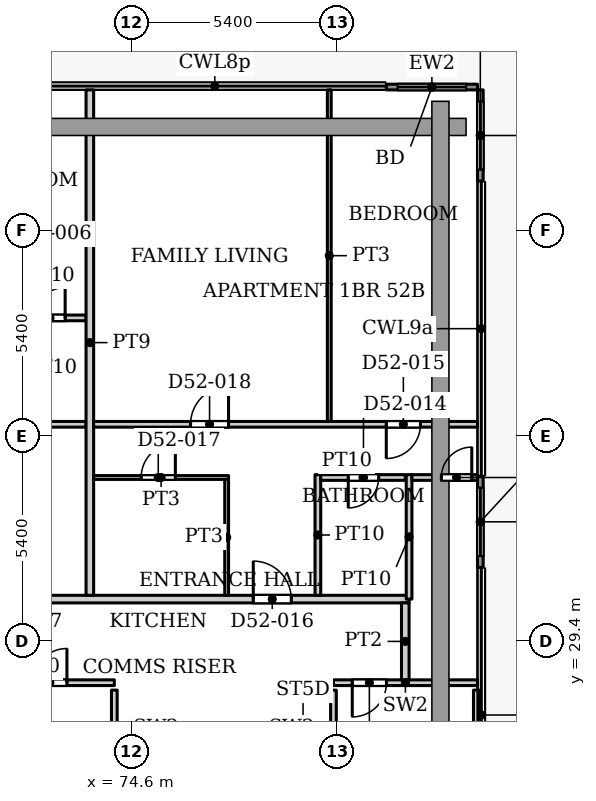
"""IFC4 building model, lengths in metres.
Left out: names, types, materials, properties, quantities, classifications, styles, units other than length and angle.
Written with IfcOpenShell. Run it as: python <this file> out.ifc"""

import sys

from ifc_helpers import new_model, si_unit, direction, frame, frame_2d, origin, place, context, subcontext, project, spatial, rectangle, extrude, source, transform, mapped, element, fill, save


model = new_model("IFC4")
c1 = context("Model", 3, precision=1e-05, world=origin(), true_north=direction((0.0, 1.0)))
c2 = subcontext(c1, "Body", "Model", "MODEL_VIEW")
j1 = project(units=[si_unit("LENGTHUNIT", "METRE"), si_unit("PLANEANGLEUNIT", "RADIAN")], contexts=[c1])
p1 = place(None, origin())
s1 = spatial("IfcSite", under=j1, at=p1, CompositionType="ELEMENT")
p2 = place(p1, origin())
s2 = spatial("IfcBuilding", under=s1, at=p2, CompositionType="ELEMENT")
p3 = place(p2, frame((0.0, 0.0, 224.0)))
s3 = spatial("IfcBuildingStorey", under=s2, at=p3, CompositionType="ELEMENT", Elevation=224.0)
p4 = place(p3, frame((81.3, 43.975, 0.0), z_axis=(0.0, 0.0, 1.0), x_axis=(1.0, 0.0, 0.0)))
e1 = element("IfcWall", 1, at=p4, inside=s3, PredefinedType="SOLIDWALL", context=c2, shape_type="SweptSolid", body=[
    extrude(rectangle(XDim=2.4, YDim=0.15, at=frame_2d((1.2, 0.0))), origin(), (0.0, 0.0, 1.0), 3.75),
])
p5 = place(p4, frame((0.3, 0.0, 0.0)))
e2 = element("IfcOpeningElement", 2, at=p5, cuts=e1, PredefinedType="OPENING", context=c2, shape_type="SweptSolid", body=[
    extrude(rectangle(XDim=1.8, YDim=2.4, at=frame_2d((0.9, 1.2))), frame((0.0, 0.085, 0.0), z_axis=(0.0, -1.0, 0.0), x_axis=(1.0, 0.0, 0.0)), (0.0, 0.0, 1.0), 0.17),
])
p6 = place(p3, frame((83.775, 43.9, 0.0), z_axis=(0.0, 0.0, 1.0), x_axis=(0.0, -1.0, 0.0)))
e3 = element("IfcWall", 3, at=p6, inside=s3, PredefinedType="SOLIDWALL", context=c2, shape_type="SweptSolid", body=[
    extrude(rectangle(XDim=2.4, YDim=0.15, at=frame_2d((1.2, 0.0))), origin(), (0.0, 0.0, 1.0), 3.75),
])
p7 = place(p6, frame((0.3, 0.0, 0.0)))
e4 = element("IfcOpeningElement", 4, at=p7, cuts=e3, PredefinedType="OPENING", context=c2, shape_type="SweptSolid", body=[
    extrude(rectangle(XDim=1.8, YDim=2.4, at=frame_2d((0.9, 1.2))), frame((0.0, 0.085, 0.0), z_axis=(0.0, -1.0, 0.0), x_axis=(1.0, 0.0, 0.0)), (0.0, 0.0, 1.0), 0.17),
])
p8 = place(p3, frame((83.775, 33.733, 0.0), z_axis=(0.0, 0.0, 1.0), x_axis=(0.0, -1.0, 0.0)))
e5 = element("IfcWall", 5, at=p8, inside=s3, PredefinedType="SOLIDWALL", context=c2, shape_type="SweptSolid", body=[
    extrude(rectangle(XDim=2.399, YDim=0.15, at=frame_2d((1.199, 0.0))), origin(), (0.0, 0.0, 1.0), 3.75),
])
p9 = place(p8, frame((0.3, 0.0, 0.0)))
e6 = element("IfcOpeningElement", 6, at=p9, cuts=e5, PredefinedType="OPENING", context=c2, shape_type="SweptSolid", body=[
    extrude(rectangle(XDim=1.8, YDim=2.4, at=frame_2d((0.9, 1.2))), frame((0.0, 0.085, 0.0), z_axis=(0.0, -1.0, 0.0), x_axis=(1.0, 0.0, 0.0)), (0.0, 0.0, 1.0), 0.17),
])
p10 = place(p3, frame((70.75, 28.3, 0.0), z_axis=(0.0, 0.0, 1.0), x_axis=(1.0, 0.0, 0.0)))
e7 = element("IfcWall", 7, at=p10, inside=s3, PredefinedType="PARTITIONING", context=c2, shape_type="SweptSolid", body=[
    extrude(rectangle(XDim=3.394, YDim=0.15, at=frame_2d((1.697, 0.0))), origin(), (0.0, 0.0, 1.0), 3.9),
])
p11 = place(p10, frame((1.247, 0.0, 0.0)))
e8 = element("IfcOpeningElement", 8, at=p11, cuts=e7, PredefinedType="OPENING", context=c2, shape_type="SweptSolid", body=[
    extrude(rectangle(XDim=0.9, YDim=2.2, at=frame_2d((0.45, 1.1))), frame((0.0, 0.085, 0.0), z_axis=(0.0, -1.0, 0.0), x_axis=(1.0, 0.0, 0.0)), (0.0, 0.0, 1.0), 0.17),
])
p12 = place(p3, frame((74.144, 26.12, 0.0), z_axis=(0.0, 0.0, 1.0), x_axis=(0.0, 1.0, 0.0)))
e9 = element("IfcWall", 9, at=p12, inside=s3, PredefinedType="PARTITIONING", context=c2, shape_type="SweptSolid", body=[
    extrude(rectangle(XDim=1.985, YDim=0.15, at=frame_2d((0.992, 0.0))), origin(), (0.0, 0.0, 1.0), 3.9),
])
p13 = place(p3, frame((79.91, 28.3, 0.0), z_axis=(0.0, 0.0, 1.0), x_axis=(1.0, 0.0, 0.0)))
e10 = element("IfcWall", 10, at=p13, inside=s3, PredefinedType="PARTITIONING", context=c2, shape_type="SweptSolid", body=[
    extrude(rectangle(XDim=3.788, YDim=0.15, at=frame_2d((1.894, 0.0))), origin(), (0.0, 0.0, 1.0), 3.9),
])
p14 = place(p13, frame((0.495, 0.0, 0.0)))
e11 = element("IfcOpeningElement", 11, at=p14, cuts=e10, PredefinedType="OPENING", context=c2, shape_type="SweptSolid", body=[
    extrude(rectangle(XDim=0.9, YDim=2.2, at=frame_2d((0.45, 1.1))), frame((0.0, 0.085, 0.0), z_axis=(0.0, -1.0, 0.0), x_axis=(1.0, 0.0, 0.0)), (0.0, 0.0, 1.0), 0.17),
])
p15 = place(p3, frame((79.91, 26.12, 0.0), z_axis=(0.0, 0.0, 1.0), x_axis=(0.0, 1.0, 0.0)))
e12 = element("IfcWall", 12, at=p15, inside=s3, PredefinedType="PARTITIONING", context=c2, shape_type="SweptSolid", body=[
    extrude(rectangle(XDim=1.985, YDim=0.15, at=frame_2d((0.992, 0.0))), origin(), (0.0, 0.0, 1.0), 3.9),
])
p16 = place(p3, frame((83.67, 21.868, 0.0), z_axis=(0.0, 0.0, 1.0), x_axis=(0.0, 1.0, 0.0)))
e13 = element("IfcWall", 13, at=p16, inside=s3, PredefinedType="PARTITIONING", context=c2, shape_type="SweptSolid", body=[
    extrude(rectangle(XDim=6.237, YDim=0.15, at=frame_2d((3.119, 0.0))), origin(), (0.0, 0.0, 1.0), 3.9),
])
p17 = place(p3, frame((53.499, 30.5, 0.0), z_axis=(0.0, 0.0, 1.0), x_axis=(1.0, 0.0, 0.0)))
e14 = element("IfcWall", 14, at=p17, inside=s3, PredefinedType="PARTITIONING", context=c2, shape_type="SweptSolid", body=[
    extrude(rectangle(XDim=28.401, YDim=0.2, at=frame_2d((14.2, 0.0))), origin(), (0.0, 0.0, 1.0), 3.6),
])
p18 = place(p17, frame((17.701, 0.0, 0.0)))
e15 = element("IfcOpeningElement", 15, at=p18, cuts=e14, PredefinedType="OPENING", context=c2, shape_type="SweptSolid", body=[
    extrude(rectangle(XDim=1.0, YDim=2.1, at=frame_2d((0.5, 1.05))), frame((0.0, 0.11, 0.0), z_axis=(0.0, -1.0, 0.0), x_axis=(1.0, 0.0, 0.0)), (0.0, 0.0, 1.0), 0.22),
])
p19 = place(p17, frame((24.301, 0.0, 0.0)))
e16 = element("IfcOpeningElement", 16, at=p19, cuts=e14, PredefinedType="OPENING", context=c2, shape_type="SweptSolid", body=[
    extrude(rectangle(XDim=1.0, YDim=2.1, at=frame_2d((0.5, 1.05))), frame((0.0, 0.11, 0.0), z_axis=(0.0, -1.0, 0.0), x_axis=(1.0, 0.0, 0.0)), (0.0, 0.0, 1.0), 0.22),
])
p20 = place(p3, frame((53.499, 35.1, 0.0), z_axis=(0.0, 0.0, 1.0), x_axis=(1.0, 0.0, 0.0)))
e17 = element("IfcWall", 17, at=p20, inside=s3, PredefinedType="PARTITIONING", context=c2, shape_type="SweptSolid", body=[
    extrude(rectangle(XDim=19.901, YDim=0.15, at=frame_2d((9.95, 0.0))), origin(), (0.0, 0.0, 1.0), 3.6),
])
p21 = place(p20, frame((8.451, 0.0, 0.0)))
e18 = element("IfcOpeningElement", 18, at=p21, cuts=e17, PredefinedType="OPENING", context=c2, shape_type="SweptSolid", body=[
    extrude(rectangle(XDim=0.9, YDim=2.1, at=frame_2d((0.45, 1.05))), frame((0.0, 0.085, 0.0), z_axis=(0.0, -1.0, 0.0), x_axis=(1.0, 0.0, 0.0)), (0.0, 0.0, 1.0), 0.17),
])
p22 = place(p20, frame((11.601, 0.0, 0.0)))
e19 = element("IfcOpeningElement", 19, at=p22, cuts=e17, PredefinedType="OPENING", context=c2, shape_type="SweptSolid", body=[
    extrude(rectangle(XDim=0.9, YDim=2.1, at=frame_2d((0.45, 1.05))), frame((0.0, 0.085, 0.0), z_axis=(0.0, -1.0, 0.0), x_axis=(1.0, 0.0, 0.0)), (0.0, 0.0, 1.0), 0.17),
])
p23 = place(p20, frame((1.701, 0.0, 0.0)))
e20 = element("IfcOpeningElement", 20, at=p23, cuts=e17, PredefinedType="OPENING", context=c2, shape_type="SweptSolid", body=[
    extrude(rectangle(XDim=1.0, YDim=2.1, at=frame_2d((0.5, 1.05))), frame((0.0, 0.085, 0.0), z_axis=(0.0, -1.0, 0.0), x_axis=(1.0, 0.0, 0.0)), (0.0, 0.0, 1.0), 0.17),
])
p24 = place(p20, frame((4.801, 0.0, 0.0)))
e21 = element("IfcOpeningElement", 21, at=p24, cuts=e17, PredefinedType="OPENING", context=c2, shape_type="SweptSolid", body=[
    extrude(rectangle(XDim=1.6, YDim=2.1, at=frame_2d((0.8, 1.05))), frame((0.0, 0.085, 0.0), z_axis=(0.0, -1.0, 0.0), x_axis=(1.0, 0.0, 0.0)), (0.0, 0.0, 1.0), 0.17),
])
p25 = place(p20, frame((15.701, 0.0, 0.0)))
e22 = element("IfcOpeningElement", 22, at=p25, cuts=e17, PredefinedType="OPENING", context=c2, shape_type="SweptSolid", body=[
    extrude(rectangle(XDim=0.9, YDim=2.1, at=frame_2d((0.45, 1.05))), frame((0.0, 0.085, 0.0), z_axis=(0.0, -1.0, 0.0), x_axis=(1.0, 0.0, 0.0)), (0.0, 0.0, 1.0), 0.17),
])
p26 = place(p3, frame((71.475, 37.9, 0.0), z_axis=(0.0, 0.0, 1.0), x_axis=(1.0, 0.0, 0.0)))
e23 = element("IfcWall", 23, at=p26, inside=s3, PredefinedType="PARTITIONING", context=c2, shape_type="SweptSolid", body=[
    extrude(rectangle(XDim=1.925, YDim=0.15, at=frame_2d((0.962, 0.0))), origin(), (0.0, 0.0, 1.0), 3.6),
])
p27 = place(p26, frame((0.575, 0.0, 0.0)))
e24 = element("IfcOpeningElement", 24, at=p27, cuts=e23, PredefinedType="OPENING", context=c2, shape_type="SweptSolid", body=[
    extrude(rectangle(XDim=0.8, YDim=2.1, at=frame_2d((0.4, 1.05))), frame((0.0, 0.085, 0.0), z_axis=(0.0, -1.0, 0.0), x_axis=(1.0, 0.0, 0.0)), (0.0, 0.0, 1.0), 0.17),
])
p28 = place(p3, frame((73.5, 30.6, 0.0), z_axis=(0.0, 0.0, 1.0), x_axis=(0.0, 1.0, 0.0)))
e25 = element("IfcWall", 25, at=p28, inside=s3, PredefinedType="PARTITIONING", context=c2, shape_type="SweptSolid", body=[
    extrude(rectangle(XDim=13.3, YDim=0.2, at=frame_2d((6.65, 0.0))), origin(), (0.0, 0.0, 1.0), 3.6),
])
p29 = place(p3, frame((73.6, 33.7, 0.0), z_axis=(0.0, 0.0, 1.0), x_axis=(1.0, 0.0, 0.0)))
e26 = element("IfcWall", 26, at=p29, inside=s3, PredefinedType="PARTITIONING", context=c2, shape_type="SweptSolid", body=[
    extrude(rectangle(XDim=3.55, YDim=0.1, at=frame_2d((1.775, 0.0))), origin(), (0.0, 0.0, 1.0), 3.6),
])
p30 = place(p29, frame((1.25, 0.0, 0.0)))
e27 = element("IfcOpeningElement", 27, at=p30, cuts=e26, PredefinedType="OPENING", context=c2, shape_type="SweptSolid", body=[
    extrude(rectangle(XDim=0.9, YDim=2.1, at=frame_2d((0.45, 1.05))), frame((0.0, 0.06, 0.0), z_axis=(0.0, -1.0, 0.0), x_axis=(1.0, 0.0, 0.0)), (0.0, 0.0, 1.0), 0.12),
])
p31 = place(p3, frame((73.6, 35.1, 0.0), z_axis=(0.0, 0.0, 1.0), x_axis=(1.0, 0.0, 0.0)))
e28 = element("IfcWall", 28, at=p31, inside=s3, PredefinedType="PARTITIONING", context=c2, shape_type="SweptSolid", body=[
    extrude(rectangle(XDim=10.1, YDim=0.15, at=frame_2d((5.05, 0.0))), origin(), (0.0, 0.0, 1.0), 3.6),
])
p32 = place(p31, frame((7.7, 0.0, 0.0)))
e29 = element("IfcOpeningElement", 29, at=p32, cuts=e28, PredefinedType="OPENING", context=c2, shape_type="SweptSolid", body=[
    extrude(rectangle(XDim=0.9, YDim=2.1, at=frame_2d((0.45, 1.05))), frame((0.0, 0.085, 0.0), z_axis=(0.0, -1.0, 0.0), x_axis=(1.0, 0.0, 0.0)), (0.0, 0.0, 1.0), 0.17),
])
p33 = place(p31, frame((2.55, 0.0, 0.0)))
e30 = element("IfcOpeningElement", 30, at=p33, cuts=e28, PredefinedType="OPENING", context=c2, shape_type="SweptSolid", body=[
    extrude(rectangle(XDim=1.0, YDim=2.1, at=frame_2d((0.5, 1.05))), frame((0.0, 0.085, 0.0), z_axis=(0.0, -1.0, 0.0), x_axis=(1.0, 0.0, 0.0)), (0.0, 0.0, 1.0), 0.17),
])
p34 = place(p3, frame((77.1, 30.6, 0.0), z_axis=(0.0, 0.0, 1.0), x_axis=(0.0, 1.0, 0.0)))
e31 = element("IfcWall", 31, at=p34, inside=s3, PredefinedType="PARTITIONING", context=c2, shape_type="SweptSolid", body=[
    extrude(rectangle(XDim=3.05, YDim=0.1, at=frame_2d((1.525, 0.0))), origin(), (0.0, 0.0, 1.0), 3.6),
])
p35 = place(p3, frame((79.5, 30.6, 0.0), z_axis=(0.0, 0.0, 1.0), x_axis=(0.0, 1.0, 0.0)))
e32 = element("IfcWall", 32, at=p35, inside=s3, PredefinedType="PARTITIONING", context=c2, shape_type="SweptSolid", body=[
    extrude(rectangle(XDim=3.175, YDim=0.15, at=frame_2d((1.587, 0.0))), origin(), (0.0, 0.0, 1.0), 3.6),
])
p36 = place(p3, frame((79.575, 33.7, 0.0), z_axis=(0.0, 0.0, 1.0), x_axis=(1.0, 0.0, 0.0)))
e33 = element("IfcWall", 33, at=p36, inside=s3, PredefinedType="PARTITIONING", context=c2, shape_type="SweptSolid", body=[
    extrude(rectangle(XDim=2.225, YDim=0.15, at=frame_2d((1.113, 0.0))), origin(), (0.0, 0.0, 1.0), 3.6),
])
p37 = place(p36, frame((0.725, 0.0, 0.0)))
e34 = element("IfcOpeningElement", 34, at=p37, cuts=e33, PredefinedType="OPENING", context=c2, shape_type="SweptSolid", body=[
    extrude(rectangle(XDim=0.8, YDim=2.1, at=frame_2d((0.4, 1.05))), frame((0.0, 0.085, 0.0), z_axis=(0.0, -1.0, 0.0), x_axis=(1.0, 0.0, 0.0)), (0.0, 0.0, 1.0), 0.17),
])
p38 = place(p3, frame((79.8, 35.175, 0.0), z_axis=(0.0, 0.0, 1.0), x_axis=(0.0, 1.0, 0.0)))
e35 = element("IfcWall", 35, at=p38, inside=s3, PredefinedType="PARTITIONING", context=c2, shape_type="SweptSolid", body=[
    extrude(rectangle(XDim=8.725, YDim=0.1, at=frame_2d((4.362, 0.0))), origin(), (0.0, 0.0, 1.0), 3.6),
])
p39 = place(p3, frame((81.8, 28.374, 0.0), z_axis=(0.0, 0.0, 1.0), x_axis=(0.0, 1.0, 0.0)))
e36 = element("IfcWall", 36, at=p39, inside=s3, PredefinedType="PARTITIONING", context=c2, shape_type="SweptSolid", body=[
    extrude(rectangle(XDim=2.026, YDim=0.2, at=frame_2d((1.013, 0.0))), origin(), (0.0, 0.0, 1.0), 3.6),
])
p40 = place(p3, frame((81.9, 30.5, 0.0), z_axis=(0.0, 0.0, 1.0), x_axis=(0.0, 1.0, 0.0)))
e37 = element("IfcWall", 37, at=p40, inside=s3, PredefinedType="PARTITIONING", context=c2, shape_type="SweptSolid", body=[
    extrude(rectangle(XDim=3.275, YDim=0.15, at=frame_2d((1.637, 0.0))), origin(), (0.0, 0.0, 1.0), 3.6),
])
p41 = place(p3, frame((81.975, 33.7, 0.0), z_axis=(0.0, 0.0, 1.0), x_axis=(1.0, 0.0, 0.0)))
e38 = element("IfcWall", 38, at=p41, inside=s3, PredefinedType="PARTITIONING", context=c2, shape_type="SweptSolid", body=[
    extrude(rectangle(XDim=1.725, YDim=0.15, at=frame_2d((0.862, 0.0))), origin(), (0.0, 0.0, 1.0), 3.6),
])
p42 = place(p41, frame((0.775, 0.0, 0.0)))
e39 = element("IfcOpeningElement", 39, at=p42, cuts=e38, PredefinedType="OPENING", context=c2, shape_type="SweptSolid", body=[
    extrude(rectangle(XDim=0.8, YDim=2.1, at=frame_2d((0.4, 1.05))), frame((0.0, 0.085, 0.0), z_axis=(0.0, -1.0, 0.0), x_axis=(1.0, 0.0, 0.0)), (0.0, 0.0, 1.0), 0.17),
])
m1 = source(origin(), c2, "Body", "SweptSolid", [
    extrude(rectangle(XDim=1.8, YDim=2.4, at=frame_2d((0.9, 1.2))), frame((0.0, 0.025, 0.0), z_axis=(0.0, -1.0, 0.0), x_axis=(1.0, 0.0, 0.0)), (0.0, 0.0, 1.0), 0.05),
])
p43 = place(p5, origin())
e40 = element("IfcDoor", 40, at=p43, inside=s3, OperationType="SLIDING_TO_LEFT", PredefinedType="DOOR", context=c2, shape_type="MappedRepresentation", body=[
    mapped(m1, transform((0.0, 0.0, 0.0), x_axis=(1.0, 0.0, 0.0), y_axis=(0.0, 1.0, 0.0), z_axis=(0.0, 0.0, 1.0), scale=1.0)),
])
fill(e2, e40)
p44 = place(p7, origin())
e41 = element("IfcDoor", 41, at=p44, inside=s3, OperationType="SLIDING_TO_LEFT", PredefinedType="DOOR", context=c2, shape_type="MappedRepresentation", body=[
    mapped(m1, transform((0.0, 0.0, 0.0), x_axis=(1.0, 0.0, 0.0), y_axis=(0.0, 1.0, 0.0), z_axis=(0.0, 0.0, 1.0), scale=1.0)),
])
fill(e4, e41)
p45 = place(p9, origin())
e42 = element("IfcDoor", 42, at=p45, inside=s3, OperationType="SLIDING_TO_LEFT", PredefinedType="DOOR", context=c2, shape_type="MappedRepresentation", body=[
    mapped(m1, transform((0.0, 0.0, 0.0), x_axis=(1.0, 0.0, 0.0), y_axis=(0.0, 1.0, 0.0), z_axis=(0.0, 0.0, 1.0), scale=1.0)),
])
fill(e6, e42)
m2 = source(origin(), c2, "Body", "SweptSolid", [
    extrude(rectangle(XDim=0.9, YDim=2.2, at=frame_2d((0.45, 1.1))), frame((0.0, 0.025, 0.0), z_axis=(0.0, -1.0, 0.0), x_axis=(1.0, 0.0, 0.0)), (0.0, 0.0, 1.0), 0.05),
])
p46 = place(p11, origin())
e43 = element("IfcDoor", 43, at=p46, inside=s3, OperationType="SINGLE_SWING_LEFT", PredefinedType="DOOR", context=c2, shape_type="MappedRepresentation", body=[
    mapped(m2, transform((0.0, 0.0, 0.0), x_axis=(1.0, 0.0, 0.0), y_axis=(0.0, 1.0, 0.0), z_axis=(0.0, 0.0, 1.0), scale=1.0)),
])
fill(e8, e43)
p47 = place(p14, origin())
e44 = element("IfcDoor", 44, at=p47, inside=s3, OperationType="SINGLE_SWING_RIGHT", PredefinedType="DOOR", context=c2, shape_type="MappedRepresentation", body=[
    mapped(m2, transform((0.0, 0.0, 0.0), x_axis=(1.0, 0.0, 0.0), y_axis=(0.0, 1.0, 0.0), z_axis=(0.0, 0.0, 1.0), scale=1.0)),
])
fill(e11, e44)
m3 = source(origin(), c2, "Body", "SweptSolid", [
    extrude(rectangle(XDim=0.8, YDim=2.1, at=frame_2d((0.4, 1.05))), frame((0.0, 0.025, 0.0), z_axis=(0.0, -1.0, 0.0), x_axis=(1.0, 0.0, 0.0)), (0.0, 0.0, 1.0), 0.05),
])
p48 = place(p27, origin())
e45 = element("IfcDoor", 45, at=p48, inside=s3, OperationType="SINGLE_SWING_LEFT", PredefinedType="DOOR", context=c2, shape_type="MappedRepresentation", body=[
    mapped(m3, transform((0.0, 0.0, 0.0), x_axis=(1.0, 0.0, 0.0), y_axis=(0.0, 1.0, 0.0), z_axis=(0.0, 0.0, 1.0), scale=1.0)),
])
fill(e24, e45)
p49 = place(p37, origin())
e46 = element("IfcDoor", 46, at=p49, inside=s3, OperationType="SINGLE_SWING_RIGHT", PredefinedType="DOOR", context=c2, shape_type="MappedRepresentation", body=[
    mapped(m3, transform((0.0, 0.0, 0.0), x_axis=(1.0, 0.0, 0.0), y_axis=(0.0, 1.0, 0.0), z_axis=(0.0, 0.0, 1.0), scale=1.0)),
])
fill(e34, e46)
m4 = source(origin(), c2, "Body", "SweptSolid", [
    extrude(rectangle(XDim=0.9, YDim=2.1, at=frame_2d((0.45, 1.05))), frame((0.0, 0.025, 0.0), z_axis=(0.0, -1.0, 0.0), x_axis=(1.0, 0.0, 0.0)), (0.0, 0.0, 1.0), 0.05),
])
p50 = place(p32, origin())
e47 = element("IfcDoor", 47, at=p50, inside=s3, OperationType="SINGLE_SWING_RIGHT", PredefinedType="DOOR", context=c2, shape_type="MappedRepresentation", body=[
    mapped(m4, transform((0.0, 0.0, 0.0), x_axis=(1.0, 0.0, 0.0), y_axis=(0.0, 1.0, 0.0), z_axis=(0.0, 0.0, 1.0), scale=1.0)),
])
fill(e29, e47)
m5 = source(origin(), c2, "Body", "SweptSolid", [
    extrude(rectangle(XDim=1.0, YDim=2.1, at=frame_2d((0.5, 1.05))), frame((0.0, 0.025, 0.0), z_axis=(0.0, -1.0, 0.0), x_axis=(1.0, 0.0, 0.0)), (0.0, 0.0, 1.0), 0.05),
])
p51 = place(p19, origin())
e48 = element("IfcDoor", 48, at=p51, inside=s3, OperationType="SINGLE_SWING_LEFT", PredefinedType="DOOR", context=c2, shape_type="MappedRepresentation", body=[
    mapped(m5, transform((0.0, 0.0, 0.0), x_axis=(1.0, 0.0, 0.0), y_axis=(0.0, 1.0, 0.0), z_axis=(0.0, 0.0, 1.0), scale=1.0)),
])
fill(e16, e48)
p52 = place(p30, origin())
e49 = element("IfcDoor", 49, at=p52, inside=s3, OperationType="SINGLE_SWING_LEFT", PredefinedType="DOOR", context=c2, shape_type="MappedRepresentation", body=[
    mapped(m4, transform((0.0, 0.0, 0.0), x_axis=(1.0, 0.0, 0.0), y_axis=(0.0, 1.0, 0.0), z_axis=(0.0, 0.0, 1.0), scale=1.0)),
])
fill(e27, e49)
m6 = source(origin(), c2, "Body", "SweptSolid", [
    extrude(rectangle(XDim=1.0, YDim=2.1, at=frame_2d((0.5, 1.05))), frame((0.0, 0.025, 0.0), z_axis=(0.0, -1.0, 0.0), x_axis=(1.0, 0.0, 0.0)), (0.0, 0.0, 1.0), 0.05),
])
p53 = place(p33, origin())
e50 = element("IfcDoor", 50, at=p53, inside=s3, OperationType="SINGLE_SWING_LEFT", PredefinedType="DOOR", context=c2, shape_type="MappedRepresentation", body=[
    mapped(m6, transform((0.0, 0.0, 0.0), x_axis=(1.0, 0.0, 0.0), y_axis=(0.0, 1.0, 0.0), z_axis=(0.0, 0.0, 1.0), scale=1.0)),
])
fill(e30, e50)
p54 = place(p42, origin())
e51 = element("IfcDoor", 51, at=p54, inside=s3, OperationType="SINGLE_SWING_LEFT", PredefinedType="DOOR", context=c2, shape_type="MappedRepresentation", body=[
    mapped(m3, transform((0.0, 0.0, 0.0), x_axis=(1.0, 0.0, 0.0), y_axis=(0.0, 1.0, 0.0), z_axis=(0.0, 0.0, 1.0), scale=1.0)),
])
fill(e39, e51)
save(model, sys.argv[1])
